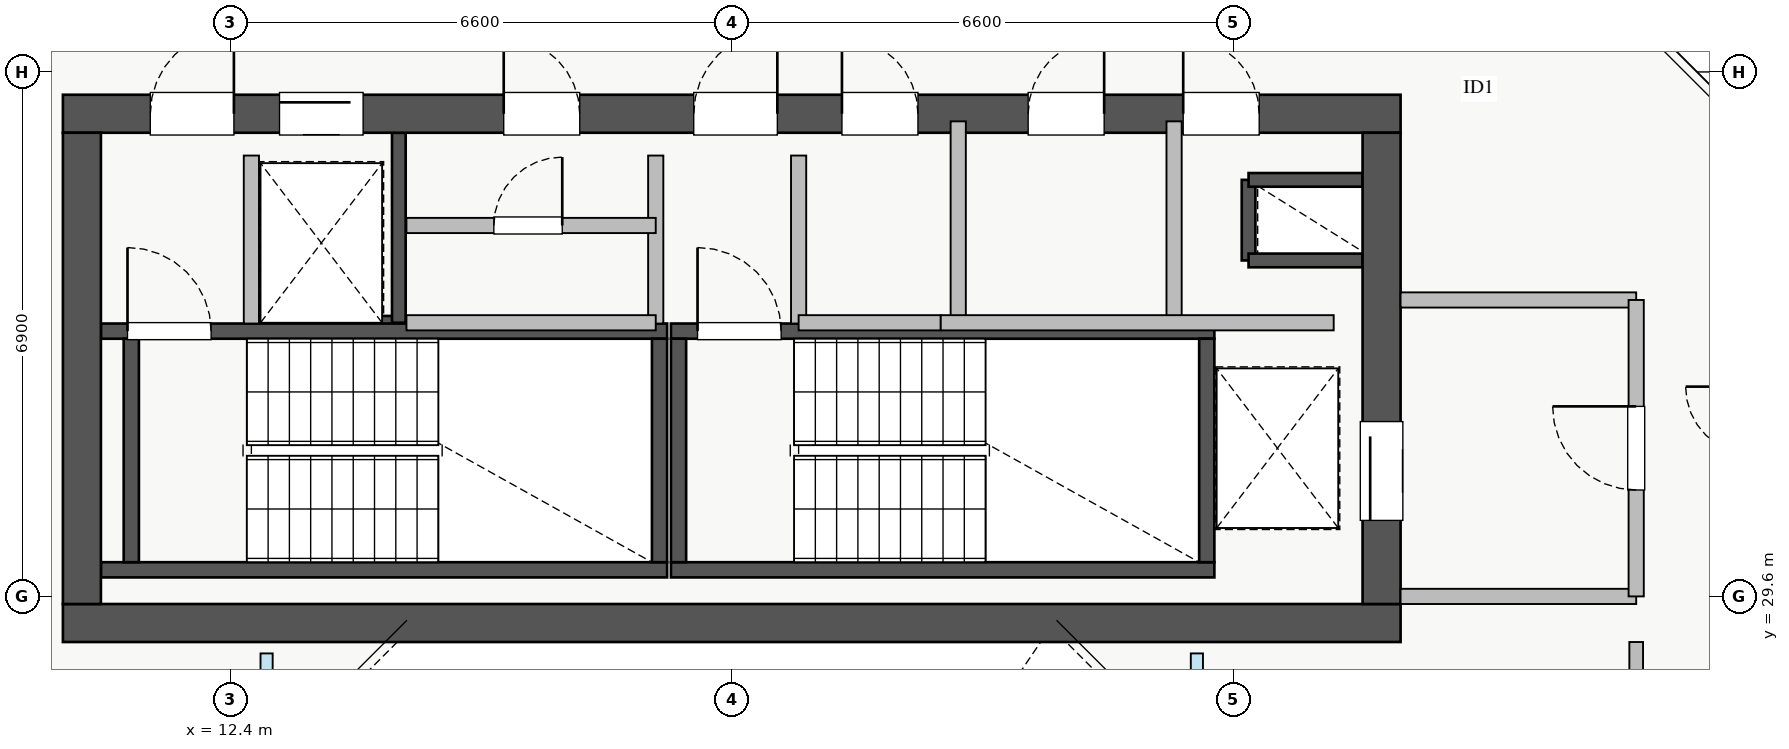
"""IFC4 building model, lengths in metres.
Left out: names, types, materials, properties, quantities, classifications, styles, units other than length and angle.
Written with IfcOpenShell. Run it as: python <this file> out.ifc"""

import sys

from ifc_helpers import new_model, si_unit, direction, frame, frame_2d, origin, place, context, subcontext, project, spatial, rectangle, extrude, source, transform, mapped, element, fill, save


model = new_model("IFC4")
c1 = context("Model", 3, precision=1e-05, world=origin(), true_north=direction((0.0, 1.0)))
c2 = subcontext(c1, "Body", "Model", "MODEL_VIEW")
j1 = project(units=[si_unit("LENGTHUNIT", "METRE"), si_unit("PLANEANGLEUNIT", "RADIAN")], contexts=[c1])
p1 = place(None, origin())
s1 = spatial("IfcSite", under=j1, at=p1, CompositionType="ELEMENT")
p2 = place(p1, origin())
s2 = spatial("IfcBuilding", under=s1, at=p2, CompositionType="ELEMENT")
p3 = place(p2, frame((0.0, 0.0, 210.0)))
s3 = spatial("IfcBuildingStorey", under=s2, at=p3, CompositionType="ELEMENT", Elevation=210.0)
p4 = place(p3, frame((12.68, 33.2, 0.0), z_axis=(0.0, 0.0, 1.0), x_axis=(1.0, 0.0, 0.0)))
e1 = element("IfcWall", 1, at=p4, inside=s3, PredefinedType="SHEAR", context=c2, shape_type="SweptSolid", body=[
    extrude(rectangle(XDim=1.94, YDim=0.18, at=frame_2d((0.97, 0.0))), origin(), (0.0, 0.0, 1.0), 3.07),
])
p5 = place(p3, frame((14.62, 33.2, 0.0), z_axis=(0.0, 0.0, 1.0), x_axis=(0.0, 1.0, 0.0)))
e2 = element("IfcWall", 2, at=p5, inside=s3, PredefinedType="SHEAR", context=c2, shape_type="SweptSolid", body=[
    extrude(rectangle(XDim=2.5, YDim=0.18, at=frame_2d((1.25, 0.0))), origin(), (0.0, 0.0, 1.0), 3.07),
])
p6 = place(p3, frame((25.8, 34.02, 0.0), z_axis=(0.0, 0.0, 1.0), x_axis=(0.0, 1.0, 0.0)))
e3 = element("IfcWall", 3, at=p6, inside=s3, PredefinedType="SHEAR", context=c2, shape_type="SweptSolid", body=[
    extrude(rectangle(XDim=1.06, YDim=0.18, at=frame_2d((0.53, 0.0))), origin(), (0.0, 0.0, 1.0), 3.07),
])
for number, where, z_axis, x_axis in (
    (4, (25.8, 35.08, 0.0), (0.0, 0.0, 1.0), (1.0, 0.0, 0.0)),
    (5, (25.8, 34.02, 0.0), (0.0, 0.0, 1.0), (1.0, 0.0, 0.0)),
):
    element("IfcWall", number, at=place(p3, frame(where, z_axis=z_axis, x_axis=x_axis)), inside=s3, PredefinedType="SHEAR", context=c2, shape_type="SweptSolid", body=[
        extrude(rectangle(XDim=1.5, YDim=0.18, at=frame_2d((0.75, 0.0))), origin(), (0.0, 0.0, 1.0), 3.07),
    ])
p7 = place(p3, frame((10.7, 29.95, 0.0), z_axis=(0.0, 0.0, 1.0), x_axis=(1.0, 0.0, 0.0)))
e6 = element("IfcWall", 6, at=p7, inside=s3, PredefinedType="SHEAR", context=c2, shape_type="SweptSolid", body=[
    extrude(rectangle(XDim=7.45, YDim=0.2, at=frame_2d((3.725, 0.0))), origin(), (0.0, 0.0, 1.0), 3.25),
])
p8 = place(p3, frame((10.7, 33.09, 0.0), z_axis=(0.0, 0.0, 1.0), x_axis=(1.0, 0.0, 0.0)))
e7 = element("IfcWall", 7, at=p8, inside=s3, PredefinedType="SHEAR", context=c2, shape_type="SweptSolid", body=[
    extrude(rectangle(XDim=7.45, YDim=0.2, at=frame_2d((3.725, 0.0))), origin(), (0.0, 0.0, 1.0), 3.25),
])
p9 = place(p8, frame((0.35, 0.0, 0.0)))
e8 = element("IfcOpeningElement", 8, at=p9, cuts=e7, PredefinedType="OPENING", context=c2, shape_type="SweptSolid", body=[
    extrude(rectangle(XDim=1.1, YDim=2.05, at=frame_2d((0.55, 1.025))), frame((0.0, 0.11, 0.0), z_axis=(0.0, -1.0, 0.0), x_axis=(1.0, 0.0, 0.0)), (0.0, 0.0, 1.0), 0.22),
])
for number, where, z_axis, x_axis in (
    (9, (11.1, 30.05, 0.0), (0.0, 0.0, 1.0), (0.0, 1.0, 0.0)),
    (10, (18.05, 30.05, 0.0), (0.0, 0.0, 1.0), (0.0, 1.0, 0.0)),
):
    element("IfcWall", number, at=place(p3, frame(where, z_axis=z_axis, x_axis=x_axis)), inside=s3, PredefinedType="SHEAR", context=c2, shape_type="SweptSolid", body=[
        extrude(rectangle(XDim=2.94, YDim=0.2, at=frame_2d((1.47, 0.0))), origin(), (0.0, 0.0, 1.0), 3.25),
    ])
p10 = place(p3, frame((18.2, 29.95, 0.0), z_axis=(0.0, 0.0, 1.0), x_axis=(1.0, 0.0, 0.0)))
e11 = element("IfcWall", 11, at=p10, inside=s3, PredefinedType="SHEAR", context=c2, shape_type="SweptSolid", body=[
    extrude(rectangle(XDim=7.15, YDim=0.2, at=frame_2d((3.575, 0.0))), origin(), (0.0, 0.0, 1.0), 3.25),
])
p11 = place(p3, frame((18.2, 33.09, 0.0), z_axis=(0.0, 0.0, 1.0), x_axis=(1.0, 0.0, 0.0)))
e12 = element("IfcWall", 12, at=p11, inside=s3, PredefinedType="SHEAR", context=c2, shape_type="SweptSolid", body=[
    extrude(rectangle(XDim=7.15, YDim=0.2, at=frame_2d((3.575, 0.0))), origin(), (0.0, 0.0, 1.0), 3.25),
])
p12 = place(p11, frame((0.35, 0.0, 0.0)))
e13 = element("IfcOpeningElement", 13, at=p12, cuts=e12, PredefinedType="OPENING", context=c2, shape_type="SweptSolid", body=[
    extrude(rectangle(XDim=1.1, YDim=2.05, at=frame_2d((0.55, 1.025))), frame((0.0, 0.11, 0.0), z_axis=(0.0, -1.0, 0.0), x_axis=(1.0, 0.0, 0.0)), (0.0, 0.0, 1.0), 0.22),
])
for number, where, z_axis, x_axis in (
    (14, (18.3, 30.05, 0.0), (0.0, 0.0, 1.0), (0.0, 1.0, 0.0)),
    (15, (25.25, 30.05, 0.0), (0.0, 0.0, 1.0), (0.0, 1.0, 0.0)),
):
    element("IfcWall", number, at=place(p3, frame(where, z_axis=z_axis, x_axis=x_axis)), inside=s3, PredefinedType="SHEAR", context=c2, shape_type="SweptSolid", body=[
        extrude(rectangle(XDim=2.94, YDim=0.2, at=frame_2d((1.47, 0.0))), origin(), (0.0, 0.0, 1.0), 3.25),
    ])
p13 = place(p3, frame((10.2, 29.25, 0.0), z_axis=(0.0, 0.0, 1.0), x_axis=(1.0, 0.0, 0.0)))
e16 = element("IfcWall", 16, at=p13, inside=s3, PredefinedType="SHEAR", context=c2, shape_type="SweptSolid", body=[
    extrude(rectangle(XDim=17.6, YDim=0.5, at=frame_2d((8.8, 0.0))), origin(), (0.0, 0.0, 1.0), 3.25),
])
p14 = place(p3, frame((10.2, 35.95, 0.0), z_axis=(0.0, 0.0, 1.0), x_axis=(1.0, 0.0, 0.0)))
e17 = element("IfcWall", 17, at=p14, inside=s3, PredefinedType="SHEAR", context=c2, shape_type="SweptSolid", body=[
    extrude(rectangle(XDim=17.6, YDim=0.5, at=frame_2d((8.8, 0.0))), origin(), (0.0, 0.0, 1.0), 3.25),
])
p15 = place(p14, frame((1.15, 0.0, 0.0)))
e18 = element("IfcOpeningElement", 18, at=p15, cuts=e17, PredefinedType="OPENING", context=c2, shape_type="SweptSolid", body=[
    extrude(rectangle(XDim=1.1, YDim=2.05, at=frame_2d((0.55, 1.025))), frame((0.0, 0.26, 0.0), z_axis=(0.0, -1.0, 0.0), x_axis=(1.0, 0.0, 0.0)), (0.0, 0.0, 1.0), 0.52),
])
p16 = place(p14, frame((8.3, 0.0, 0.0)))
e19 = element("IfcOpeningElement", 19, at=p16, cuts=e17, PredefinedType="OPENING", context=c2, shape_type="SweptSolid", body=[
    extrude(rectangle(XDim=1.1, YDim=2.05, at=frame_2d((0.55, 1.025))), frame((0.0, 0.26, 0.0), z_axis=(0.0, -1.0, 0.0), x_axis=(1.0, 0.0, 0.0)), (0.0, 0.0, 1.0), 0.52),
])
p17 = place(p14, frame((2.85, 0.0, 0.0)))
e20 = element("IfcOpeningElement", 20, at=p17, cuts=e17, PredefinedType="OPENING", context=c2, shape_type="SweptSolid", body=[
    extrude(rectangle(XDim=1.1, YDim=2.05, at=frame_2d((0.55, 1.025))), frame((0.0, 0.26, 0.0), z_axis=(0.0, -1.0, 0.0), x_axis=(1.0, 0.0, 0.0)), (0.0, 0.0, 1.0), 0.52),
])
p18 = place(p14, frame((5.8, 0.0, 0.0)))
e21 = element("IfcOpeningElement", 21, at=p18, cuts=e17, PredefinedType="OPENING", context=c2, shape_type="SweptSolid", body=[
    extrude(rectangle(XDim=1.0, YDim=2.05, at=frame_2d((0.5, 1.025))), frame((0.0, 0.26, 0.0), z_axis=(0.0, -1.0, 0.0), x_axis=(1.0, 0.0, 0.0)), (0.0, 0.0, 1.0), 0.52),
])
p19 = place(p14, frame((14.74, 0.0, 0.0)))
e22 = element("IfcOpeningElement", 22, at=p19, cuts=e17, PredefinedType="OPENING", context=c2, shape_type="SweptSolid", body=[
    extrude(rectangle(XDim=1.0, YDim=2.05, at=frame_2d((0.5, 1.025))), frame((0.0, 0.26, 0.0), z_axis=(0.0, -1.0, 0.0), x_axis=(1.0, 0.0, 0.0)), (0.0, 0.0, 1.0), 0.52),
])
p20 = place(p14, frame((10.25, 0.0, 0.0)))
e23 = element("IfcOpeningElement", 23, at=p20, cuts=e17, PredefinedType="OPENING", context=c2, shape_type="SweptSolid", body=[
    extrude(rectangle(XDim=1.0, YDim=2.05, at=frame_2d((0.5, 1.025))), frame((0.0, 0.26, 0.0), z_axis=(0.0, -1.0, 0.0), x_axis=(1.0, 0.0, 0.0)), (0.0, 0.0, 1.0), 0.52),
])
p21 = place(p14, frame((12.7, 0.0, 0.0)))
e24 = element("IfcOpeningElement", 24, at=p21, cuts=e17, PredefinedType="OPENING", context=c2, shape_type="SweptSolid", body=[
    extrude(rectangle(XDim=1.0, YDim=2.05, at=frame_2d((0.5, 1.025))), frame((0.0, 0.26, 0.0), z_axis=(0.0, -1.0, 0.0), x_axis=(1.0, 0.0, 0.0)), (0.0, 0.0, 1.0), 0.52),
])
p22 = place(p3, frame((10.45, 29.5, 0.0), z_axis=(0.0, 0.0, 1.0), x_axis=(0.0, 1.0, 0.0)))
e25 = element("IfcWall", 25, at=p22, inside=s3, PredefinedType="SHEAR", context=c2, shape_type="SweptSolid", body=[
    extrude(rectangle(XDim=6.2, YDim=0.5, at=frame_2d((3.1, 0.0))), origin(), (0.0, 0.0, 1.0), 3.25),
])
p23 = place(p3, frame((27.55, 29.5, 0.0), z_axis=(0.0, 0.0, 1.0), x_axis=(0.0, 1.0, 0.0)))
e26 = element("IfcWall", 26, at=p23, inside=s3, PredefinedType="SHEAR", context=c2, shape_type="SweptSolid", body=[
    extrude(rectangle(XDim=6.2, YDim=0.5, at=frame_2d((3.1, 0.0))), origin(), (0.0, 0.0, 1.0), 3.25),
])
p24 = place(p23, frame((1.1, 0.0, 0.0)))
e27 = element("IfcOpeningElement", 27, at=p24, cuts=e26, PredefinedType="OPENING", context=c2, shape_type="SweptSolid", body=[
    extrude(rectangle(XDim=1.3, YDim=2.05, at=frame_2d((0.65, 1.025))), frame((0.0, 0.26, 0.0), z_axis=(0.0, -1.0, 0.0), x_axis=(1.0, 0.0, 0.0)), (0.0, 0.0, 1.0), 0.52),
])
p25 = place(p3, frame((27.8, 29.6, 0.0), z_axis=(0.0, 0.0, 1.0), x_axis=(1.0, 0.0, 0.0)))
e28 = element("IfcWall", 28, at=p25, inside=s3, PredefinedType="PARTITIONING", context=c2, shape_type="SweptSolid", body=[
    extrude(rectangle(XDim=3.1, YDim=0.2, at=frame_2d((1.55, 0.0))), origin(), (0.0, 0.0, 1.0), 3.07),
])
p26 = place(p3, frame((27.8, 33.5, 0.0), z_axis=(0.0, 0.0, 1.0), x_axis=(1.0, 0.0, 0.0)))
e29 = element("IfcWall", 29, at=p26, inside=s3, PredefinedType="PARTITIONING", context=c2, shape_type="SweptSolid", body=[
    extrude(rectangle(XDim=3.1, YDim=0.2, at=frame_2d((1.55, 0.0))), origin(), (0.0, 0.0, 1.0), 2.265),
])
p27 = place(p3, frame((30.9, 29.6, 0.0), z_axis=(0.0, 0.0, 1.0), x_axis=(0.0, 1.0, 0.0)))
e30 = element("IfcWall", 30, at=p27, inside=s3, PredefinedType="PARTITIONING", context=c2, shape_type="SweptSolid", body=[
    extrude(rectangle(XDim=3.9, YDim=0.2, at=frame_2d((1.95, 0.0))), origin(), (0.0, 0.0, 1.0), 3.07),
])
p28 = place(p27, frame((1.4, 0.0, 0.0)))
e31 = element("IfcOpeningElement", 31, at=p28, cuts=e30, PredefinedType="OPENING", context=c2, shape_type="SweptSolid", body=[
    extrude(rectangle(XDim=1.1, YDim=2.05, at=frame_2d((0.55, 1.025))), frame((0.0, 0.11, 0.0), z_axis=(0.0, -1.0, 0.0), x_axis=(1.0, 0.0, 0.0)), (0.0, 0.0, 1.0), 0.22),
])
for number, where, z_axis, x_axis in (
    (32, (12.68, 33.19, 0.0), (0.0, 0.0, 1.0), (0.0, 1.0, 0.0)),
    (33, (18.0, 33.19, 0.0), (0.0, 0.0, 1.0), (0.0, 1.0, 0.0)),
    (34, (19.88, 33.19, 0.0), (0.0, 0.0, 1.0), (0.0, 1.0, 0.0)),
):
    element("IfcWall", number, at=place(p3, frame(where, z_axis=z_axis, x_axis=x_axis)), inside=s3, PredefinedType="PARTITIONING", context=c2, shape_type="SweptSolid", body=[
        extrude(rectangle(XDim=2.21, YDim=0.2, at=frame_2d((1.105, 0.0))), origin(), (0.0, 0.0, 1.0), 3.07),
    ])
p29 = place(p3, frame((14.72, 34.48, 0.0), z_axis=(0.0, 0.0, 1.0), x_axis=(1.0, 0.0, 0.0)))
e35 = element("IfcWall", 35, at=p29, inside=s3, PredefinedType="PARTITIONING", context=c2, shape_type="SweptSolid", body=[
    extrude(rectangle(XDim=3.28, YDim=0.2, at=frame_2d((1.64, 0.0))), origin(), (0.0, 0.0, 1.0), 3.07),
])
p30 = place(p29, frame((1.15, 0.0, 0.0)))
e36 = element("IfcOpeningElement", 36, at=p30, cuts=e35, PredefinedType="OPENING", context=c2, shape_type="SweptSolid", body=[
    extrude(rectangle(XDim=0.9, YDim=2.05, at=frame_2d((0.45, 1.025))), frame((0.0, 0.11, 0.0), z_axis=(0.0, -1.0, 0.0), x_axis=(1.0, 0.0, 0.0)), (0.0, 0.0, 1.0), 0.22),
])
p31 = place(p3, frame((14.72, 33.2, 0.0), z_axis=(0.0, 0.0, 1.0), x_axis=(1.0, 0.0, 0.0)))
e37 = element("IfcWall", 37, at=p31, inside=s3, PredefinedType="PARTITIONING", context=c2, shape_type="SweptSolid", body=[
    extrude(rectangle(XDim=3.28, YDim=0.2, at=frame_2d((1.64, 0.0))), origin(), (0.0, 0.0, 1.0), 3.07),
])
p32 = place(p3, frame((24.82, 33.2, 0.0), z_axis=(0.0, 0.0, 1.0), x_axis=(0.0, 1.0, 0.0)))
e38 = element("IfcWall", 38, at=p32, inside=s3, PredefinedType="PARTITIONING", context=c2, shape_type="SweptSolid", body=[
    extrude(rectangle(XDim=2.65, YDim=0.2, at=frame_2d((1.325, 0.0))), origin(), (0.0, 0.0, 1.0), 3.07),
])
p33 = place(p3, frame((19.88, 33.2, 0.0), z_axis=(0.0, 0.0, 1.0), x_axis=(1.0, 0.0, 0.0)))
e39 = element("IfcWall", 39, at=p33, inside=s3, PredefinedType="PARTITIONING", context=c2, shape_type="SweptSolid", body=[
    extrude(rectangle(XDim=1.87, YDim=0.2, at=frame_2d((0.935, 0.0))), origin(), (0.0, 0.0, 1.0), 3.07),
])
p34 = place(p3, frame((21.98, 33.2, 0.0), z_axis=(0.0, 0.0, 1.0), x_axis=(0.0, 1.0, 0.0)))
e40 = element("IfcWall", 40, at=p34, inside=s3, PredefinedType="PARTITIONING", context=c2, shape_type="SweptSolid", body=[
    extrude(rectangle(XDim=2.65, YDim=0.2, at=frame_2d((1.325, 0.0))), origin(), (0.0, 0.0, 1.0), 3.07),
])
p35 = place(p3, frame((21.75, 33.2, 0.0), z_axis=(0.0, 0.0, 1.0), x_axis=(1.0, 0.0, 0.0)))
e41 = element("IfcWall", 41, at=p35, inside=s3, PredefinedType="PARTITIONING", context=c2, shape_type="SweptSolid", body=[
    extrude(rectangle(XDim=5.17, YDim=0.2, at=frame_2d((2.585, 0.0))), origin(), (0.0, 0.0, 1.0), 3.07),
])
p36 = place(p3, frame((30.9, 17.0, 0.0), z_axis=(0.0, 0.0, 1.0), x_axis=(0.0, 1.0, 0.0)))
e42 = element("IfcWall", 42, at=p36, inside=s3, PredefinedType="PARTITIONING", context=c2, shape_type="SweptSolid", body=[
    extrude(rectangle(XDim=12.0, YDim=0.18, at=frame_2d((6.0, 0.0))), origin(), (0.0, 0.0, 1.0), 3.07),
])
p37 = place(p36, frame((1.5, 0.0, 0.0)))
e43 = element("IfcOpeningElement", 43, at=p37, cuts=e42, PredefinedType="OPENING", context=c2, shape_type="SweptSolid", body=[
    extrude(rectangle(XDim=1.0, YDim=2.05, at=frame_2d((0.5, 1.025))), frame((0.0, 0.1, 0.0), z_axis=(0.0, -1.0, 0.0), x_axis=(1.0, 0.0, 0.0)), (0.0, 0.0, 1.0), 0.2),
])
p38 = place(p36, frame((5.5, 0.0, 0.0)))
e44 = element("IfcOpeningElement", 44, at=p38, cuts=e42, PredefinedType="OPENING", context=c2, shape_type="SweptSolid", body=[
    extrude(rectangle(XDim=1.0, YDim=2.05, at=frame_2d((0.5, 1.025))), frame((0.0, 0.1, 0.0), z_axis=(0.0, -1.0, 0.0), x_axis=(1.0, 0.0, 0.0)), (0.0, 0.0, 1.0), 0.2),
])
p39 = place(p36, frame((9.5, 0.0, 0.0)))
e45 = element("IfcOpeningElement", 45, at=p39, cuts=e42, PredefinedType="OPENING", context=c2, shape_type="SweptSolid", body=[
    extrude(rectangle(XDim=1.0, YDim=2.05, at=frame_2d((0.5, 1.025))), frame((0.0, 0.1, 0.0), z_axis=(0.0, -1.0, 0.0), x_axis=(1.0, 0.0, 0.0)), (0.0, 0.0, 1.0), 0.2),
])
m1 = source(origin(), c2, "Body", "SweptSolid", [
    extrude(rectangle(XDim=1.3, YDim=2.05, at=frame_2d((0.65, 1.025))), frame((0.0, 0.025, 0.0), z_axis=(0.0, -1.0, 0.0), x_axis=(1.0, 0.0, 0.0)), (0.0, 0.0, 1.0), 0.05),
])
p40 = place(p24, origin())
e46 = element("IfcDoor", 46, at=p40, inside=s3, OperationType="SLIDING_TO_LEFT", PredefinedType="DOOR", context=c2, shape_type="MappedRepresentation", body=[
    mapped(m1, transform((0.0, 0.0, 0.0), x_axis=(1.0, 0.0, 0.0), y_axis=(0.0, 1.0, 0.0), z_axis=(0.0, 0.0, 1.0), scale=1.0)),
])
fill(e27, e46)
m2 = source(origin(), c2, "Body", "SweptSolid", [
    extrude(rectangle(XDim=1.1, YDim=2.05, at=frame_2d((0.55, 1.025))), frame((0.0, 0.025, 0.0), z_axis=(0.0, -1.0, 0.0), x_axis=(1.0, 0.0, 0.0)), (0.0, 0.0, 1.0), 0.05),
])
p41 = place(p15, origin())
e47 = element("IfcDoor", 47, at=p41, inside=s3, OperationType="SINGLE_SWING_RIGHT", PredefinedType="DOOR", context=c2, shape_type="MappedRepresentation", body=[
    mapped(m2, transform((0.0, 0.0, 0.0), x_axis=(1.0, 0.0, 0.0), y_axis=(0.0, 1.0, 0.0), z_axis=(0.0, 0.0, 1.0), scale=1.0)),
])
fill(e18, e47)
p42 = place(p9, origin())
e48 = element("IfcDoor", 48, at=p42, inside=s3, OperationType="SINGLE_SWING_LEFT", PredefinedType="DOOR", context=c2, shape_type="MappedRepresentation", body=[
    mapped(m2, transform((0.0, 0.0, 0.0), x_axis=(1.0, 0.0, 0.0), y_axis=(0.0, 1.0, 0.0), z_axis=(0.0, 0.0, 1.0), scale=1.0)),
])
fill(e8, e48)
p43 = place(p16, origin())
e49 = element("IfcDoor", 49, at=p43, inside=s3, OperationType="SINGLE_SWING_RIGHT", PredefinedType="DOOR", context=c2, shape_type="MappedRepresentation", body=[
    mapped(m2, transform((0.0, 0.0, 0.0), x_axis=(1.0, 0.0, 0.0), y_axis=(0.0, 1.0, 0.0), z_axis=(0.0, 0.0, 1.0), scale=1.0)),
])
fill(e19, e49)
p44 = place(p12, origin())
e50 = element("IfcDoor", 50, at=p44, inside=s3, OperationType="SINGLE_SWING_LEFT", PredefinedType="DOOR", context=c2, shape_type="MappedRepresentation", body=[
    mapped(m2, transform((0.0, 0.0, 0.0), x_axis=(1.0, 0.0, 0.0), y_axis=(0.0, 1.0, 0.0), z_axis=(0.0, 0.0, 1.0), scale=1.0)),
])
fill(e13, e50)
p45 = place(p17, origin())
e51 = element("IfcDoor", 51, at=p45, inside=s3, OperationType="SLIDING_TO_LEFT", PredefinedType="DOOR", context=c2, shape_type="MappedRepresentation", body=[
    mapped(m2, transform((0.0, 0.0, 0.0), x_axis=(1.0, 0.0, 0.0), y_axis=(0.0, 1.0, 0.0), z_axis=(0.0, 0.0, 1.0), scale=1.0)),
])
fill(e20, e51)
m3 = source(origin(), c2, "Body", "SweptSolid", [
    extrude(rectangle(XDim=1.0, YDim=2.05, at=frame_2d((0.5, 1.025))), frame((0.0, 0.025, 0.0), z_axis=(0.0, -1.0, 0.0), x_axis=(1.0, 0.0, 0.0)), (0.0, 0.0, 1.0), 0.05),
])
p46 = place(p18, origin())
e52 = element("IfcDoor", 52, at=p46, inside=s3, OperationType="SINGLE_SWING_LEFT", PredefinedType="DOOR", context=c2, shape_type="MappedRepresentation", body=[
    mapped(m3, transform((0.0, 0.0, 0.0), x_axis=(1.0, 0.0, 0.0), y_axis=(0.0, 1.0, 0.0), z_axis=(0.0, 0.0, 1.0), scale=1.0)),
])
fill(e21, e52)
p47 = place(p19, origin())
e53 = element("IfcDoor", 53, at=p47, inside=s3, OperationType="SINGLE_SWING_LEFT", PredefinedType="DOOR", context=c2, shape_type="MappedRepresentation", body=[
    mapped(m3, transform((0.0, 0.0, 0.0), x_axis=(1.0, 0.0, 0.0), y_axis=(0.0, 1.0, 0.0), z_axis=(0.0, 0.0, 1.0), scale=1.0)),
])
fill(e22, e53)
p48 = place(p20, origin())
e54 = element("IfcDoor", 54, at=p48, inside=s3, OperationType="SINGLE_SWING_LEFT", PredefinedType="DOOR", context=c2, shape_type="MappedRepresentation", body=[
    mapped(m3, transform((0.0, 0.0, 0.0), x_axis=(1.0, 0.0, 0.0), y_axis=(0.0, 1.0, 0.0), z_axis=(0.0, 0.0, 1.0), scale=1.0)),
])
fill(e23, e54)
p49 = place(p21, origin())
e55 = element("IfcDoor", 55, at=p49, inside=s3, OperationType="SINGLE_SWING_RIGHT", PredefinedType="DOOR", context=c2, shape_type="MappedRepresentation", body=[
    mapped(m3, transform((0.0, 0.0, 0.0), x_axis=(1.0, 0.0, 0.0), y_axis=(0.0, 1.0, 0.0), z_axis=(0.0, 0.0, 1.0), scale=1.0)),
])
fill(e24, e55)
p50 = place(p28, origin())
e56 = element("IfcDoor", 56, at=p50, inside=s3, OperationType="SINGLE_SWING_RIGHT", PredefinedType="DOOR", context=c2, shape_type="MappedRepresentation", body=[
    mapped(m2, transform((0.0, 0.0, 0.0), x_axis=(1.0, 0.0, 0.0), y_axis=(0.0, 1.0, 0.0), z_axis=(0.0, 0.0, 1.0), scale=1.0)),
])
fill(e31, e56)
m4 = source(origin(), c2, "Body", "SweptSolid", [
    extrude(rectangle(XDim=0.9, YDim=2.05, at=frame_2d((0.45, 1.025))), frame((0.0, 0.025, 0.0), z_axis=(0.0, -1.0, 0.0), x_axis=(1.0, 0.0, 0.0)), (0.0, 0.0, 1.0), 0.05),
])
p51 = place(p30, origin())
e57 = element("IfcDoor", 57, at=p51, inside=s3, OperationType="SINGLE_SWING_RIGHT", PredefinedType="DOOR", context=c2, shape_type="MappedRepresentation", body=[
    mapped(m4, transform((0.0, 0.0, 0.0), x_axis=(1.0, 0.0, 0.0), y_axis=(0.0, 1.0, 0.0), z_axis=(0.0, 0.0, 1.0), scale=1.0)),
])
fill(e36, e57)
save(model, sys.argv[1])
